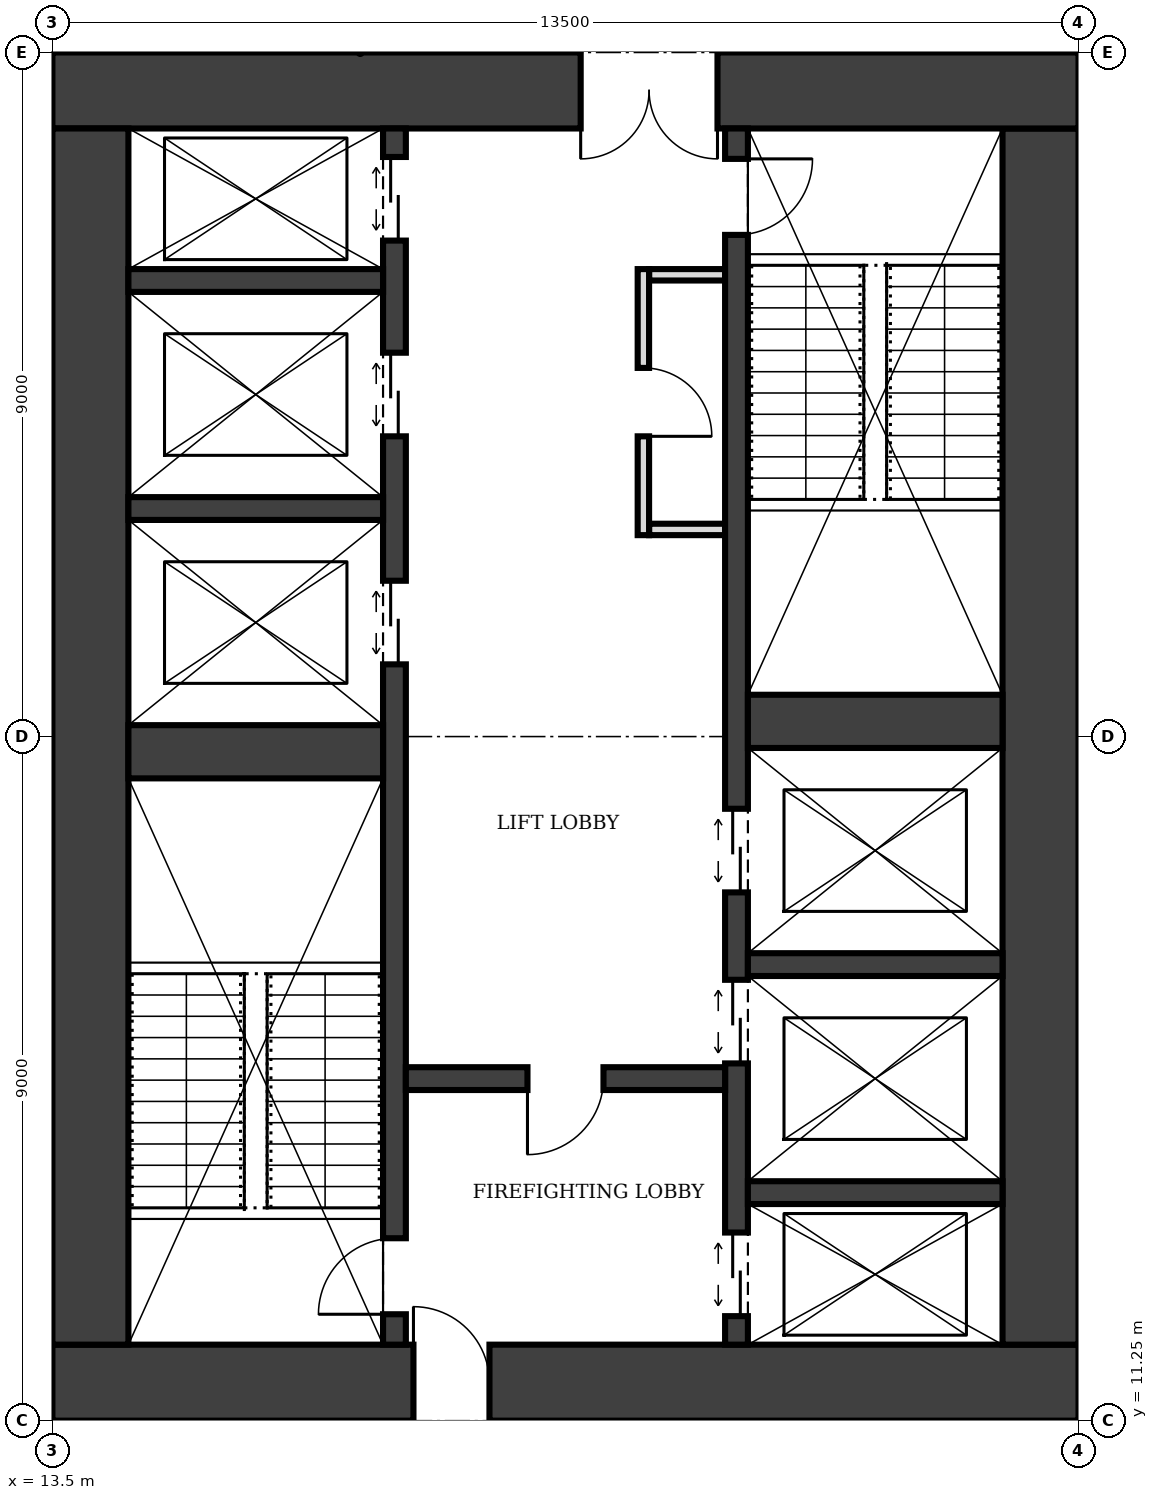
"""IFC4 building model, lengths in metres.
Left out: names, types, materials, properties, quantities, classifications, styles, units other than length and angle.
Written with IfcOpenShell. Run it as: python <this file> out.ifc"""

import sys

from ifc_helpers import new_model, si_unit, direction, frame, frame_2d, origin, place, context, subcontext, project, spatial, rectangle, extrude, element, fill, save


model = new_model("IFC4")
c1 = context("Model", 3, precision=1e-05, world=origin(), true_north=direction((0.0, 1.0)))
c2 = subcontext(c1, "Body", "Model", "MODEL_VIEW")
j1 = project(units=[si_unit("LENGTHUNIT", "METRE"), si_unit("PLANEANGLEUNIT", "RADIAN")], contexts=[c1])
p1 = place(None, origin())
s1 = spatial("IfcSite", under=j1, at=p1, CompositionType="ELEMENT")
p2 = place(p1, origin())
s2 = spatial("IfcBuilding", under=s1, at=p2, CompositionType="ELEMENT")
p3 = place(p2, frame((0.0, 0.0, 105.0)))
s3 = spatial("IfcBuildingStorey", under=s2, at=p3, CompositionType="ELEMENT", Elevation=105.0)
p4 = place(p3, frame((13.5, 11.75, 0.0), z_axis=(0.0, 0.0, 1.0), x_axis=(1.0, 0.0, 0.0)))
e1 = element("IfcWall", 1, at=p4, inside=s3, PredefinedType="SHEAR", context=c2, shape_type="SweptSolid", body=[
    extrude(rectangle(XDim=13.5, YDim=1.0, at=frame_2d((6.75, 0.0))), origin(), (0.0, 0.0, 1.0), 4.0),
])
p5 = place(p4, frame((4.75, 0.0, 0.0)))
e2 = element("IfcOpeningElement", 2, at=p5, cuts=e1, PredefinedType="OPENING", context=c2, shape_type="SweptSolid", body=[
    extrude(rectangle(XDim=1.0, YDim=2.1, at=frame_2d((0.5, 1.05))), frame((0.0, 0.51, 0.0), z_axis=(0.0, -1.0, 0.0), x_axis=(1.0, 0.0, 0.0)), (0.0, 0.0, 1.0), 1.02),
])
p6 = place(p3, frame((26.5, 12.25, 0.0), z_axis=(0.0, 0.0, 1.0), x_axis=(0.0, 1.0, 0.0)))
e3 = element("IfcWall", 3, at=p6, inside=s3, PredefinedType="SHEAR", context=c2, shape_type="SweptSolid", body=[
    extrude(rectangle(XDim=16.0, YDim=1.0, at=frame_2d((8.0, 0.0))), origin(), (0.0, 0.0, 1.0), 4.0),
])
p7 = place(p3, frame((27.0, 28.75, 0.0), z_axis=(0.0, 0.0, 1.0), x_axis=(-1.0, 0.0, 0.0)))
e4 = element("IfcWall", 4, at=p7, inside=s3, PredefinedType="SHEAR", context=c2, shape_type="SweptSolid", body=[
    extrude(rectangle(XDim=13.5, YDim=1.0, at=frame_2d((6.75, 0.0))), origin(), (0.0, 0.0, 1.0), 4.0),
])
p8 = place(p7, frame((4.75, 0.0, 0.0)))
e5 = element("IfcOpeningElement", 5, at=p8, cuts=e4, PredefinedType="OPENING", context=c2, shape_type="SweptSolid", body=[
    extrude(rectangle(XDim=1.8, YDim=2.1, at=frame_2d((0.9, 1.05))), frame((0.0, 0.51, 0.0), z_axis=(0.0, -1.0, 0.0), x_axis=(1.0, 0.0, 0.0)), (0.0, 0.0, 1.0), 1.02),
])
p9 = place(p3, frame((14.0, 28.25, 0.0), z_axis=(0.0, 0.0, 1.0), x_axis=(0.0, -1.0, 0.0)))
e6 = element("IfcWall", 6, at=p9, inside=s3, PredefinedType="SHEAR", context=c2, shape_type="SweptSolid", body=[
    extrude(rectangle(XDim=16.0, YDim=1.0, at=frame_2d((8.0, 0.0))), origin(), (0.0, 0.0, 1.0), 4.0),
])
p10 = place(p3, frame((18.0, 12.25, 0.0), z_axis=(0.0, 0.0, 1.0), x_axis=(0.0, 1.0, 0.0)))
e7 = element("IfcWall", 7, at=p10, inside=s3, PredefinedType="SHEAR", context=c2, shape_type="SweptSolid", body=[
    extrude(rectangle(XDim=16.0, YDim=0.3, at=frame_2d((8.0, 0.0))), origin(), (0.0, 0.0, 1.0), 4.0),
])
p11 = place(p10, frame((0.4, 0.0, 0.0)))
e8 = element("IfcOpeningElement", 8, at=p11, cuts=e7, PredefinedType="OPENING", context=c2, shape_type="SweptSolid", body=[
    extrude(rectangle(XDim=1.0, YDim=2.1, at=frame_2d((0.5, 1.05))), frame((0.0, 0.16, 0.0), z_axis=(0.0, -1.0, 0.0), x_axis=(1.0, 0.0, 0.0)), (0.0, 0.0, 1.0), 0.32),
])
p12 = place(p10, frame((8.95, 0.0, 0.0)))
e9 = element("IfcOpeningElement", 9, at=p12, cuts=e7, PredefinedType="OPENING", context=c2, shape_type="SweptSolid", body=[
    extrude(rectangle(XDim=1.1, YDim=2.1, at=frame_2d((0.55, 1.05))), frame((0.0, 0.16, 0.0), z_axis=(0.0, -1.0, 0.0), x_axis=(1.0, 0.0, 0.0)), (0.0, 0.0, 1.0), 0.32),
])
p13 = place(p10, frame((11.95, 0.0, 0.0)))
e10 = element("IfcOpeningElement", 10, at=p13, cuts=e7, PredefinedType="OPENING", context=c2, shape_type="SweptSolid", body=[
    extrude(rectangle(XDim=1.1, YDim=2.1, at=frame_2d((0.55, 1.05))), frame((0.0, 0.16, 0.0), z_axis=(0.0, -1.0, 0.0), x_axis=(1.0, 0.0, 0.0)), (0.0, 0.0, 1.0), 0.32),
])
p14 = place(p10, frame((14.525, 0.0, 0.0)))
e11 = element("IfcOpeningElement", 11, at=p14, cuts=e7, PredefinedType="OPENING", context=c2, shape_type="SweptSolid", body=[
    extrude(rectangle(XDim=1.1, YDim=2.1, at=frame_2d((0.55, 1.05))), frame((0.0, 0.16, 0.0), z_axis=(0.0, -1.0, 0.0), x_axis=(1.0, 0.0, 0.0)), (0.0, 0.0, 1.0), 0.32),
])
p15 = place(p3, frame((22.5, 12.25, 0.0), z_axis=(0.0, 0.0, 1.0), x_axis=(0.0, 1.0, 0.0)))
e12 = element("IfcWall", 12, at=p15, inside=s3, PredefinedType="SHEAR", context=c2, shape_type="SweptSolid", body=[
    extrude(rectangle(XDim=16.0, YDim=0.3, at=frame_2d((8.0, 0.0))), origin(), (0.0, 0.0, 1.0), 4.0),
])
p16 = place(p15, frame((14.6, 0.0, 0.0)))
e13 = element("IfcOpeningElement", 13, at=p16, cuts=e12, PredefinedType="OPENING", context=c2, shape_type="SweptSolid", body=[
    extrude(rectangle(XDim=1.0, YDim=2.1, at=frame_2d((0.5, 1.05))), frame((0.0, 0.16, 0.0), z_axis=(0.0, -1.0, 0.0), x_axis=(1.0, 0.0, 0.0)), (0.0, 0.0, 1.0), 0.32),
])
p17 = place(p15, frame((0.375, 0.0, 0.0)))
e14 = element("IfcOpeningElement", 14, at=p17, cuts=e12, PredefinedType="OPENING", context=c2, shape_type="SweptSolid", body=[
    extrude(rectangle(XDim=1.1, YDim=2.1, at=frame_2d((0.55, 1.05))), frame((0.0, 0.16, 0.0), z_axis=(0.0, -1.0, 0.0), x_axis=(1.0, 0.0, 0.0)), (0.0, 0.0, 1.0), 0.32),
])
p18 = place(p15, frame((3.7, 0.0, 0.0)))
e15 = element("IfcOpeningElement", 15, at=p18, cuts=e12, PredefinedType="OPENING", context=c2, shape_type="SweptSolid", body=[
    extrude(rectangle(XDim=1.1, YDim=2.1, at=frame_2d((0.55, 1.05))), frame((0.0, 0.16, 0.0), z_axis=(0.0, -1.0, 0.0), x_axis=(1.0, 0.0, 0.0)), (0.0, 0.0, 1.0), 0.32),
])
p19 = place(p15, frame((5.95, 0.0, 0.0)))
e16 = element("IfcOpeningElement", 16, at=p19, cuts=e12, PredefinedType="OPENING", context=c2, shape_type="SweptSolid", body=[
    extrude(rectangle(XDim=1.1, YDim=2.1, at=frame_2d((0.55, 1.05))), frame((0.0, 0.16, 0.0), z_axis=(0.0, -1.0, 0.0), x_axis=(1.0, 0.0, 0.0)), (0.0, 0.0, 1.0), 0.32),
])
p20 = place(p3, frame((14.5, 20.05, 0.0), z_axis=(0.0, 0.0, 1.0), x_axis=(1.0, 0.0, 0.0)))
e17 = element("IfcWall", 17, at=p20, inside=s3, PredefinedType="SHEAR", context=c2, shape_type="SweptSolid", body=[
    extrude(rectangle(XDim=3.35, YDim=0.7, at=frame_2d((1.675, 0.0))), origin(), (0.0, 0.0, 1.0), 4.0),
])
p21 = place(p3, frame((18.15, 15.75, 0.0), z_axis=(0.0, 0.0, 1.0), x_axis=(1.0, 0.0, 0.0)))
e18 = element("IfcWall", 18, at=p21, inside=s3, PredefinedType="SHEAR", context=c2, shape_type="SweptSolid", body=[
    extrude(rectangle(XDim=4.2, YDim=0.3, at=frame_2d((2.1, 0.0))), origin(), (0.0, 0.0, 1.0), 4.0),
])
p22 = place(p21, frame((1.6, 0.0, 0.0)))
e19 = element("IfcOpeningElement", 19, at=p22, cuts=e18, PredefinedType="OPENING", context=c2, shape_type="SweptSolid", body=[
    extrude(rectangle(XDim=1.0, YDim=2.1, at=frame_2d((0.5, 1.05))), frame((0.0, 0.16, 0.0), z_axis=(0.0, -1.0, 0.0), x_axis=(1.0, 0.0, 0.0)), (0.0, 0.0, 1.0), 0.32),
])
for number, where, z_axis, x_axis in (
    (20, (22.65, 14.25, 0.0), (0.0, 0.0, 1.0), (1.0, 0.0, 0.0)),
    (21, (22.65, 17.25, 0.0), (0.0, 0.0, 1.0), (1.0, 0.0, 0.0)),
):
    element("IfcWall", number, at=place(p3, frame(where, z_axis=z_axis, x_axis=x_axis)), inside=s3, PredefinedType="SHEAR", context=c2, shape_type="SweptSolid", body=[
        extrude(rectangle(XDim=3.35, YDim=0.3, at=frame_2d((1.675, 0.0))), origin(), (0.0, 0.0, 1.0), 4.0),
    ])
p23 = place(p3, frame((22.65, 20.45, 0.0), z_axis=(0.0, 0.0, 1.0), x_axis=(1.0, 0.0, 0.0)))
e22 = element("IfcWall", 22, at=p23, inside=s3, PredefinedType="SHEAR", context=c2, shape_type="SweptSolid", body=[
    extrude(rectangle(XDim=3.35, YDim=0.7, at=frame_2d((1.675, 0.0))), origin(), (0.0, 0.0, 1.0), 4.0),
])
for number, where, z_axis, x_axis in (
    (23, (14.5, 23.25, 0.0), (0.0, 0.0, 1.0), (1.0, 0.0, 0.0)),
    (24, (14.5, 26.25, 0.0), (0.0, 0.0, 1.0), (1.0, 0.0, 0.0)),
):
    element("IfcWall", number, at=place(p3, frame(where, z_axis=z_axis, x_axis=x_axis)), inside=s3, PredefinedType="SHEAR", context=c2, shape_type="SweptSolid", body=[
        extrude(rectangle(XDim=3.35, YDim=0.3, at=frame_2d((1.675, 0.0))), origin(), (0.0, 0.0, 1.0), 4.0),
    ])
p24 = place(p3, frame((21.275, 22.9, 0.0), z_axis=(0.0, 0.0, 1.0), x_axis=(0.0, 1.0, 0.0)))
e25 = element("IfcWall", 25, at=p24, inside=s3, PredefinedType="PARTITIONING", context=c2, shape_type="SweptSolid", body=[
    extrude(rectangle(XDim=3.5, YDim=0.15, at=frame_2d((1.75, 0.0))), origin(), (0.0, 0.0, 1.0), 3.75),
])
p25 = place(p24, frame((1.3, 0.0, 0.0)))
e26 = element("IfcOpeningElement", 26, at=p25, cuts=e25, PredefinedType="OPENING", context=c2, shape_type="SweptSolid", body=[
    extrude(rectangle(XDim=0.9, YDim=2.1, at=frame_2d((0.45, 1.05))), frame((0.0, 0.085, 0.0), z_axis=(0.0, -1.0, 0.0), x_axis=(1.0, 0.0, 0.0)), (0.0, 0.0, 1.0), 0.17),
])
for number, where, z_axis, x_axis in (
    (27, (21.35, 22.975, 0.0), (0.0, 0.0, 1.0), (1.0, 0.0, 0.0)),
    (28, (21.35, 26.325, 0.0), (0.0, 0.0, 1.0), (1.0, 0.0, 0.0)),
):
    element("IfcWall", number, at=place(p3, frame(where, z_axis=z_axis, x_axis=x_axis)), inside=s3, PredefinedType="PARTITIONING", context=c2, shape_type="SweptSolid", body=[
        extrude(rectangle(XDim=1.0, YDim=0.15, at=frame_2d((0.5, 0.0))), origin(), (0.0, 0.0, 1.0), 3.75),
    ])
p26 = place(p5, origin())
e29 = element("IfcDoor", 29, at=p26, inside=s3, OperationType="SINGLE_SWING_LEFT", PredefinedType="DOOR", context=c2, shape_type="SweptSolid", body=[
    extrude(rectangle(XDim=1.0, YDim=2.1, at=frame_2d((0.5, 1.05))), frame((0.0, 0.025, 0.0), z_axis=(0.0, -1.0, 0.0), x_axis=(1.0, 0.0, 0.0)), (0.0, 0.0, 1.0), 0.05),
])
fill(e2, e29)
p27 = place(p8, origin())
e30 = element("IfcDoor", 30, at=p27, inside=s3, OperationType="DOUBLE_DOOR_SINGLE_SWING", PredefinedType="DOOR", context=c2, shape_type="SweptSolid", body=[
    extrude(rectangle(XDim=1.8, YDim=2.1, at=frame_2d((0.9, 1.05))), frame((0.0, 0.025, 0.0), z_axis=(0.0, -1.0, 0.0), x_axis=(1.0, 0.0, 0.0)), (0.0, 0.0, 1.0), 0.05),
])
fill(e5, e30)
p28 = place(p22, frame((1.0, 0.0, 0.0), z_axis=(0.0, 0.0, 1.0), x_axis=(-1.0, 0.0, 0.0)))
e31 = element("IfcDoor", 31, at=p28, inside=s3, OperationType="SINGLE_SWING_RIGHT", PredefinedType="DOOR", context=c2, shape_type="SweptSolid", body=[
    extrude(rectangle(XDim=1.0, YDim=2.1, at=frame_2d((0.5, 1.05))), frame((0.0, 0.025, 0.0), z_axis=(0.0, -1.0, 0.0), x_axis=(1.0, 0.0, 0.0)), (0.0, 0.0, 1.0), 0.05),
])
fill(e19, e31)
p29 = place(p11, origin())
e32 = element("IfcDoor", 32, at=p29, inside=s3, OperationType="SINGLE_SWING_LEFT", PredefinedType="DOOR", context=c2, shape_type="SweptSolid", body=[
    extrude(rectangle(XDim=1.0, YDim=2.1, at=frame_2d((0.5, 1.05))), frame((0.0, 0.025, 0.0), z_axis=(0.0, -1.0, 0.0), x_axis=(1.0, 0.0, 0.0)), (0.0, 0.0, 1.0), 0.05),
])
fill(e8, e32)
p30 = place(p16, frame((1.0, 0.0, 0.0), z_axis=(0.0, 0.0, 1.0), x_axis=(-1.0, 0.0, 0.0)))
e33 = element("IfcDoor", 33, at=p30, inside=s3, OperationType="SINGLE_SWING_LEFT", PredefinedType="DOOR", context=c2, shape_type="SweptSolid", body=[
    extrude(rectangle(XDim=1.0, YDim=2.1, at=frame_2d((0.5, 1.05))), frame((0.0, 0.025, 0.0), z_axis=(0.0, -1.0, 0.0), x_axis=(1.0, 0.0, 0.0)), (0.0, 0.0, 1.0), 0.05),
])
fill(e13, e33)
p31 = place(p17, origin())
e34 = element("IfcDoor", 34, at=p31, inside=s3, OperationType="DOUBLE_DOOR_SLIDING", PredefinedType="DOOR", context=c2, shape_type="SweptSolid", body=[
    extrude(rectangle(XDim=1.1, YDim=2.1, at=frame_2d((0.55, 1.05))), frame((0.0, 0.025, 0.0), z_axis=(0.0, -1.0, 0.0), x_axis=(1.0, 0.0, 0.0)), (0.0, 0.0, 1.0), 0.05),
])
fill(e14, e34)
p32 = place(p12, origin())
e35 = element("IfcDoor", 35, at=p32, inside=s3, OperationType="DOUBLE_DOOR_SLIDING", PredefinedType="DOOR", context=c2, shape_type="SweptSolid", body=[
    extrude(rectangle(XDim=1.1, YDim=2.1, at=frame_2d((0.55, 1.05))), frame((0.0, 0.025, 0.0), z_axis=(0.0, -1.0, 0.0), x_axis=(1.0, 0.0, 0.0)), (0.0, 0.0, 1.0), 0.05),
])
fill(e9, e35)
p33 = place(p13, origin())
e36 = element("IfcDoor", 36, at=p33, inside=s3, OperationType="DOUBLE_DOOR_SLIDING", PredefinedType="DOOR", context=c2, shape_type="SweptSolid", body=[
    extrude(rectangle(XDim=1.1, YDim=2.1, at=frame_2d((0.55, 1.05))), frame((0.0, 0.025, 0.0), z_axis=(0.0, -1.0, 0.0), x_axis=(1.0, 0.0, 0.0)), (0.0, 0.0, 1.0), 0.05),
])
fill(e10, e36)
p34 = place(p14, origin())
e37 = element("IfcDoor", 37, at=p34, inside=s3, OperationType="DOUBLE_DOOR_SLIDING", PredefinedType="DOOR", context=c2, shape_type="SweptSolid", body=[
    extrude(rectangle(XDim=1.1, YDim=2.1, at=frame_2d((0.55, 1.05))), frame((0.0, 0.025, 0.0), z_axis=(0.0, -1.0, 0.0), x_axis=(1.0, 0.0, 0.0)), (0.0, 0.0, 1.0), 0.05),
])
fill(e11, e37)
p35 = place(p18, origin())
e38 = element("IfcDoor", 38, at=p35, inside=s3, OperationType="DOUBLE_DOOR_SLIDING", PredefinedType="DOOR", context=c2, shape_type="SweptSolid", body=[
    extrude(rectangle(XDim=1.1, YDim=2.1, at=frame_2d((0.55, 1.05))), frame((0.0, 0.025, 0.0), z_axis=(0.0, -1.0, 0.0), x_axis=(1.0, 0.0, 0.0)), (0.0, 0.0, 1.0), 0.05),
])
fill(e15, e38)
p36 = place(p19, origin())
e39 = element("IfcDoor", 39, at=p36, inside=s3, OperationType="DOUBLE_DOOR_SLIDING", PredefinedType="DOOR", context=c2, shape_type="SweptSolid", body=[
    extrude(rectangle(XDim=1.1, YDim=2.1, at=frame_2d((0.55, 1.05))), frame((0.0, 0.025, 0.0), z_axis=(0.0, -1.0, 0.0), x_axis=(1.0, 0.0, 0.0)), (0.0, 0.0, 1.0), 0.05),
])
fill(e16, e39)
p37 = place(p25, frame((0.9, 0.0, 0.0), z_axis=(0.0, 0.0, 1.0), x_axis=(-1.0, 0.0, 0.0)))
e40 = element("IfcDoor", 40, at=p37, inside=s3, OperationType="SINGLE_SWING_RIGHT", PredefinedType="DOOR", context=c2, shape_type="SweptSolid", body=[
    extrude(rectangle(XDim=0.9, YDim=2.1, at=frame_2d((0.45, 1.05))), frame((0.0, 0.025, 0.0), z_axis=(0.0, -1.0, 0.0), x_axis=(1.0, 0.0, 0.0)), (0.0, 0.0, 1.0), 0.05),
])
fill(e26, e40)
save(model, sys.argv[1])
